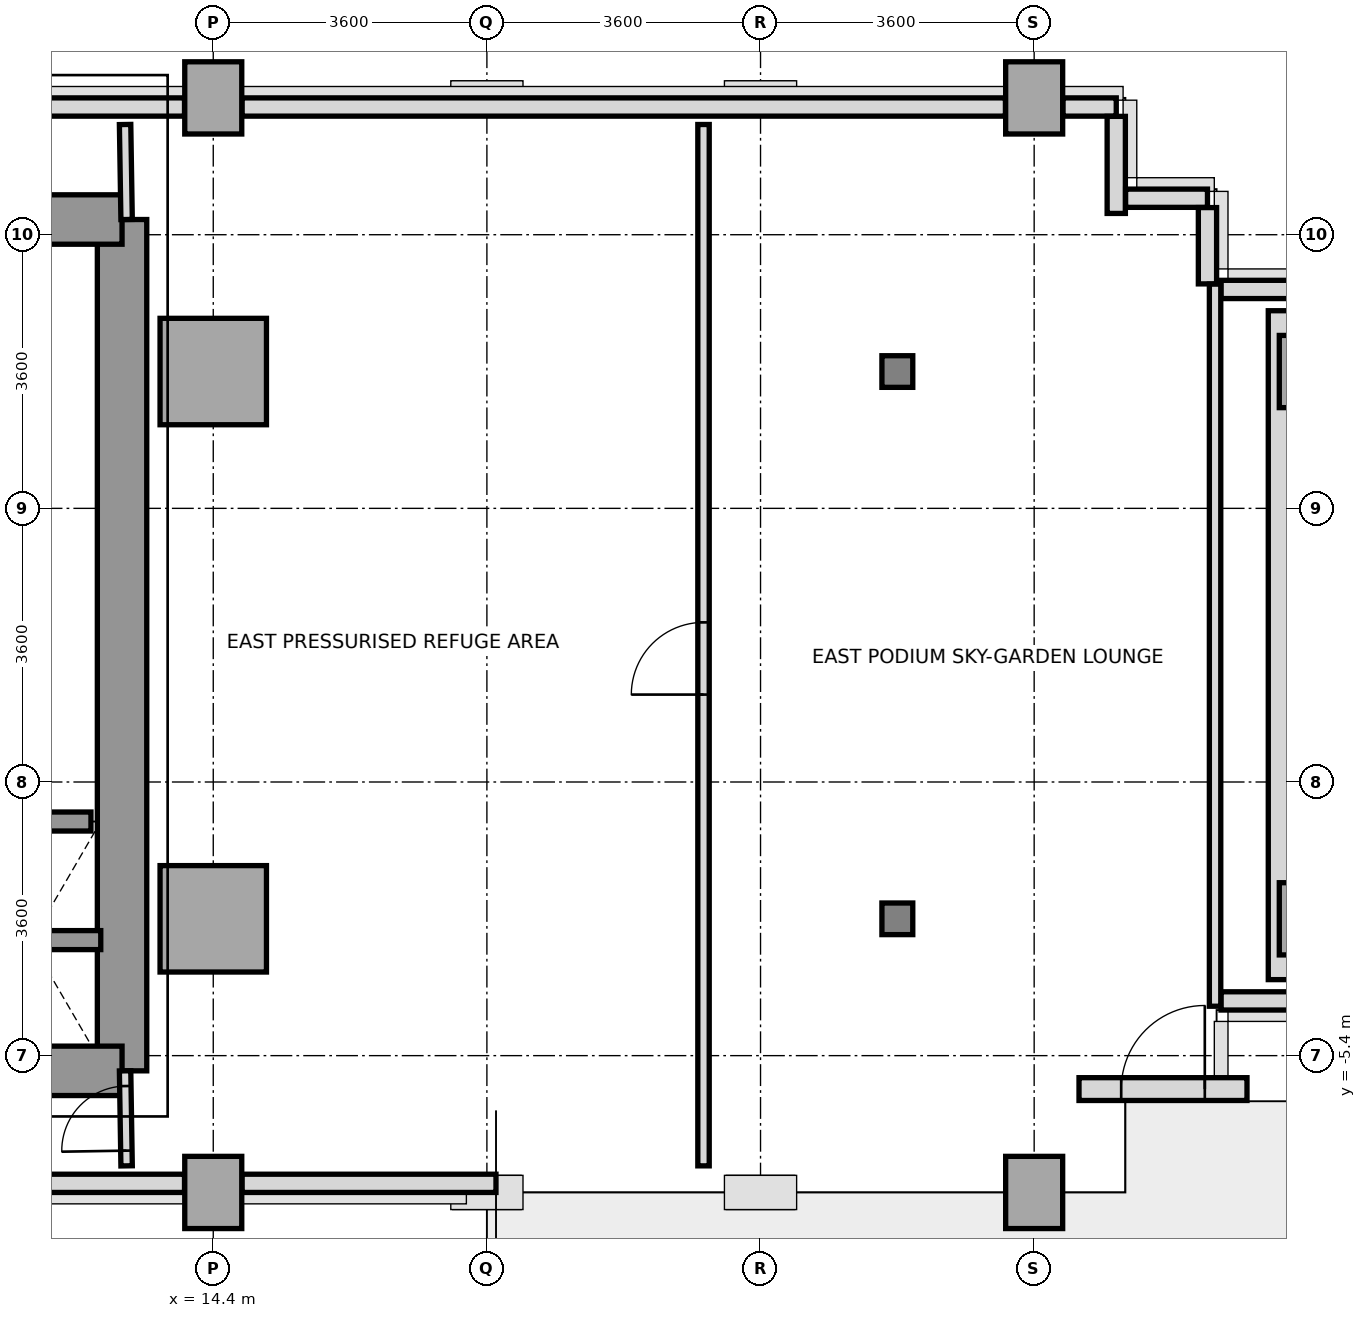
"""IFC4 building model, lengths in metres.
Left out: names, types, materials, properties, quantities, classifications, styles, units other than length and angle.
Written with IfcOpenShell. Run it as: python <this file> out.ifc"""

import sys

from ifc_helpers import new_model, si_unit, direction, frame, frame_2d, origin, origin_2d, place, context, subcontext, project, spatial, rectangle, i_section, extrude, source, transform, mapped, element, fill, save


model = new_model("IFC4")
c1 = context("Model", 3, precision=1e-05, world=origin(), true_north=direction((0.0, 1.0)))
c2 = subcontext(c1, "Body", "Model", "MODEL_VIEW")
j1 = project(units=[si_unit("LENGTHUNIT", "METRE"), si_unit("PLANEANGLEUNIT", "RADIAN")], contexts=[c1])
p1 = place(None, origin())
s1 = spatial("IfcSite", under=j1, at=p1, CompositionType="ELEMENT")
p2 = place(p1, origin())
s2 = spatial("IfcBuilding", under=s1, at=p2, CompositionType="ELEMENT")
p3 = place(p2, frame((0.0, 0.0, 25.2)))
s3 = spatial("IfcBuildingStorey", under=s2, at=p3, CompositionType="ELEMENT", Elevation=25.2)
m1 = source(origin(), c2, "Body", "SweptSolid", [
    extrude(rectangle(XDim=0.75, YDim=0.95, at=origin_2d()), origin(), (0.0, 0.0, 1.0), 5.2),
])
p4 = place(p3, frame((14.4, -7.2, 0.0), z_axis=(0.0, 0.0, 1.0), x_axis=(1.0, 0.0, 0.0)))
e1 = element("IfcColumn", 1, at=p4, inside=s3, PredefinedType="COLUMN", context=c2, shape_type="MappedRepresentation", body=[
    mapped(m1, transform((0.0, 0.0, 0.0), x_axis=(1.0, 0.0, 0.0), y_axis=(0.0, 1.0, 0.0), z_axis=(0.0, 0.0, 1.0), scale=1.0)),
])
m2 = source(origin(), c2, "Body", "SweptSolid", [
    extrude(rectangle(XDim=1.4, YDim=1.4, at=origin_2d()), origin(), (0.0, 0.0, 1.0), 5.2),
])
for number, where, z_axis, x_axis in (
    (2, (14.4, -3.6, 0.0), (0.0, 0.0, 1.0), (1.0, 0.0, 0.0)),
    (3, (14.4, 3.6, 0.0), (0.0, 0.0, 1.0), (1.0, 0.0, 0.0)),
):
    element("IfcColumn", number, at=place(p3, frame(where, z_axis=z_axis, x_axis=x_axis)), inside=s3, PredefinedType="COLUMN", context=c2, shape_type="MappedRepresentation", body=[
        mapped(m2, transform((0.0, 0.0, 0.0), x_axis=(1.0, 0.0, 0.0), y_axis=(0.0, 1.0, 0.0), z_axis=(0.0, 0.0, 1.0), scale=1.0)),
    ])
p5 = place(p3, frame((14.4, 7.2, 0.0), z_axis=(0.0, 0.0, 1.0), x_axis=(1.0, 0.0, 0.0)))
e4 = element("IfcColumn", 4, at=p5, inside=s3, PredefinedType="COLUMN", context=c2, shape_type="MappedRepresentation", body=[
    mapped(m1, transform((0.0, 0.0, 0.0), x_axis=(1.0, 0.0, 0.0), y_axis=(0.0, 1.0, 0.0), z_axis=(0.0, 0.0, 1.0), scale=1.0)),
])
m3 = source(origin(), c2, "Body", "SweptSolid", [
    extrude(i_section(OverallWidth=0.406, OverallDepth=0.416, WebThickness=0.024, FlangeThickness=0.039, at=origin_2d()), origin(), (0.0, 0.0, 1.0), 5.2),
])
for number, where, z_axis, x_axis in (
    (5, (23.4, -3.6, 0.0), (0.0, 0.0, 1.0), (1.0, 0.0, 0.0)),
    (6, (23.4, 3.6, 0.0), (0.0, 0.0, 1.0), (1.0, 0.0, 0.0)),
):
    element("IfcColumn", number, at=place(p3, frame(where, z_axis=z_axis, x_axis=x_axis)), inside=s3, PredefinedType="COLUMN", context=c2, shape_type="MappedRepresentation", body=[
        mapped(m3, transform((0.0, 0.0, 0.0), x_axis=(1.0, 0.0, 0.0), y_axis=(0.0, 1.0, 0.0), z_axis=(0.0, 0.0, 1.0), scale=1.0)),
    ])
for number, where, z_axis, x_axis in (
    (7, (25.2, -7.2, 0.0), (0.0, 0.0, 1.0), (1.0, 0.0, 0.0)),
    (8, (25.2, 7.2, 0.0), (0.0, 0.0, 1.0), (1.0, 0.0, 0.0)),
    (9, (28.8, -3.6, 0.0), (0.0, 0.0, 1.0), (1.0, 0.0, 0.0)),
    (10, (28.8, 3.6, 0.0), (0.0, 0.0, 1.0), (1.0, 0.0, 0.0)),
):
    element("IfcColumn", number, at=place(p3, frame(where, z_axis=z_axis, x_axis=x_axis)), inside=s3, PredefinedType="COLUMN", context=c2, shape_type="MappedRepresentation", body=[
        mapped(m1, transform((0.0, 0.0, 0.0), x_axis=(1.0, 0.0, 0.0), y_axis=(0.0, 1.0, 0.0), z_axis=(0.0, 0.0, 1.0), scale=1.0)),
    ])
p6 = place(p3, frame((28.45, -4.4, 0.0), z_axis=(0.0, 0.0, 1.0), x_axis=(0.0, 1.0, 0.0)))
e11 = element("IfcWall", 11, at=p6, inside=s3, PredefinedType="SOLIDWALL", context=c2, shape_type="SweptSolid", body=[
    extrude(rectangle(XDim=8.8, YDim=0.34, at=frame_2d((4.4, 0.0))), origin(), (0.0, 0.0, 1.0), 4.386),
])
p7 = place(p3, frame((25.79, -5.84, 0.0), z_axis=(0.0, 0.0, 1.0), x_axis=(1.0, 0.0, 0.0)))
e12 = element("IfcWall", 12, at=p7, inside=s3, PredefinedType="SOLIDWALL", context=c2, shape_type="SweptSolid", body=[
    extrude(rectangle(XDim=2.21, YDim=0.3, at=frame_2d((1.105, 0.0))), origin(), (0.0, 0.0, 1.0), 3.4),
])
p8 = place(p7, frame((0.555, 0.0, 0.0)))
e13 = element("IfcOpeningElement", 13, at=p8, cuts=e12, PredefinedType="OPENING", context=c2, shape_type="SweptSolid", body=[
    extrude(rectangle(XDim=1.1, YDim=2.3, at=frame_2d((0.55, 1.15))), frame((0.0, 0.16, 0.0), z_axis=(0.0, -1.0, 0.0), x_axis=(1.0, 0.0, 0.0)), (0.0, 0.0, 1.0), 0.32),
])
p9 = place(p3, frame((28.68, -4.68, 0.0), z_axis=(0.0, 0.0, 1.0), x_axis=(-1.0, 0.0, 0.0)))
e14 = element("IfcWall", 14, at=p9, inside=s3, PredefinedType="PARAPET", context=c2, shape_type="SweptSolid", body=[
    extrude(rectangle(XDim=1.022, YDim=0.24, at=frame_2d((0.511, 0.0))), origin(), (0.0, 0.0, 1.0), 1.15),
])
p10 = place(p3, frame((18.119, -7.08, 0.0), z_axis=(0.0, 0.0, 1.0), x_axis=(-1.0, 0.0, 0.0)))
e15 = element("IfcWall", 15, at=p10, inside=s3, PredefinedType="PARAPET", context=c2, shape_type="SweptSolid", body=[
    extrude(rectangle(XDim=3.341, YDim=0.24, at=frame_2d((1.671, 0.0))), origin(), (0.0, 0.0, 1.0), 1.15),
])
p11 = place(p3, frame((14.022, -7.08, 0.0), z_axis=(0.0, 0.0, 1.0), x_axis=(-1.0, 0.0, 0.0)))
e16 = element("IfcWall", 16, at=p11, inside=s3, PredefinedType="PARAPET", context=c2, shape_type="SweptSolid", body=[
    extrude(rectangle(XDim=4.742, YDim=0.24, at=frame_2d((2.371, 0.0))), origin(), (0.0, 0.0, 1.0), 1.15),
])
p12 = place(p3, frame((11.295, 7.08, 0.0), z_axis=(0.0, 0.0, 1.0), x_axis=(1.0, 0.0, 0.0)))
e17 = element("IfcWall", 17, at=p12, inside=s3, PredefinedType="PARAPET", context=c2, shape_type="SweptSolid", body=[
    extrude(rectangle(XDim=2.727, YDim=0.24, at=frame_2d((1.364, 0.0))), origin(), (0.0, 0.0, 1.0), 1.15),
])
p13 = place(p3, frame((14.778, 7.08, 0.0), z_axis=(0.0, 0.0, 1.0), x_axis=(1.0, 0.0, 0.0)))
e18 = element("IfcWall", 18, at=p13, inside=s3, PredefinedType="PARAPET", context=c2, shape_type="SweptSolid", body=[
    extrude(rectangle(XDim=10.044, YDim=0.24, at=frame_2d((5.022, 0.0))), origin(), (0.0, 0.0, 1.0), 1.15),
])
p14 = place(p3, frame((25.578, 7.08, 0.0), z_axis=(0.0, 0.0, 1.0), x_axis=(1.0, 0.0, 0.0)))
e19 = element("IfcWall", 19, at=p14, inside=s3, PredefinedType="PARAPET", context=c2, shape_type="SweptSolid", body=[
    extrude(rectangle(XDim=0.702, YDim=0.24, at=frame_2d((0.351, 0.0))), origin(), (0.0, 0.0, 1.0), 1.15),
])
p15 = place(p3, frame((26.28, 6.957, 0.0), z_axis=(0.0, 0.0, 1.0), x_axis=(0.0, -1.0, 0.0)))
e20 = element("IfcWall", 20, at=p15, inside=s3, PredefinedType="PARAPET", context=c2, shape_type="SweptSolid", body=[
    extrude(rectangle(XDim=1.277, YDim=0.24, at=frame_2d((0.639, 0.0))), origin(), (0.0, 0.0, 1.0), 1.15),
])
p16 = place(p3, frame((26.403, 5.88, 0.0), z_axis=(0.0, 0.0, 1.0), x_axis=(1.0, 0.0, 0.0)))
e21 = element("IfcWall", 21, at=p16, inside=s3, PredefinedType="PARAPET", context=c2, shape_type="SweptSolid", body=[
    extrude(rectangle(XDim=1.077, YDim=0.24, at=frame_2d((0.539, 0.0))), origin(), (0.0, 0.0, 1.0), 1.15),
])
p17 = place(p3, frame((27.48, 5.757, 0.0), z_axis=(0.0, 0.0, 1.0), x_axis=(0.0, -1.0, 0.0)))
e22 = element("IfcWall", 22, at=p17, inside=s3, PredefinedType="PARAPET", context=c2, shape_type="SweptSolid", body=[
    extrude(rectangle(XDim=1.004, YDim=0.24, at=frame_2d((0.502, 0.0))), origin(), (0.0, 0.0, 1.0), 1.15),
])
p18 = place(p3, frame((27.658, 4.68, 0.0), z_axis=(0.0, 0.0, 1.0), x_axis=(1.0, 0.0, 0.0)))
e23 = element("IfcWall", 23, at=p18, inside=s3, PredefinedType="PARAPET", context=c2, shape_type="SweptSolid", body=[
    extrude(rectangle(XDim=1.022, YDim=0.24, at=frame_2d((0.511, 0.0))), origin(), (0.0, 0.0, 1.0), 1.15),
])
p19 = place(p3, frame((13.2, -5.6, 0.0), z_axis=(0.0, 0.0, 1.0), x_axis=(0.0, 1.0, 0.0)))
e24 = element("IfcWall", 24, at=p19, inside=s3, PredefinedType="SHEAR", context=c2, shape_type="SweptSolid", body=[
    extrude(rectangle(XDim=11.2, YDim=0.65, at=frame_2d((5.6, 0.0))), origin(), (0.0, 0.0, 1.0), 5.2),
])
p20 = place(p3, frame((11.381, 5.6, 0.0), z_axis=(0.0, 0.0, 1.0), x_axis=(1.0, 0.0, 0.0)))
e25 = element("IfcWall", 25, at=p20, inside=s3, PredefinedType="SHEAR", context=c2, shape_type="SweptSolid", body=[
    extrude(rectangle(XDim=1.819, YDim=0.65, at=frame_2d((0.909, 0.0))), origin(), (0.0, 0.0, 1.0), 5.2),
])
p21 = place(p3, frame((5.4, -5.6, 0.0), z_axis=(0.0, 0.0, 1.0), x_axis=(1.0, 0.0, 0.0)))
e26 = element("IfcWall", 26, at=p21, inside=s3, PredefinedType="SHEAR", context=c2, shape_type="SweptSolid", body=[
    extrude(rectangle(XDim=7.8, YDim=0.65, at=frame_2d((3.9, 0.0))), origin(), (0.0, 0.0, 1.0), 5.2),
])
p22 = place(p21, frame((3.0, 0.0, 0.0)))
e27 = element("IfcOpeningElement", 27, at=p22, cuts=e26, PredefinedType="OPENING", context=c2, shape_type="SweptSolid", body=[
    extrude(rectangle(XDim=1.2, YDim=2.2, at=frame_2d((0.6, 1.1))), frame((0.0, 0.335, 0.0), z_axis=(0.0, -1.0, 0.0), x_axis=(1.0, 0.0, 0.0)), (0.0, 0.0, 1.0), 0.67),
])
p23 = place(p3, frame((11.08, -3.88, 0.0), z_axis=(0.0, 0.0, 1.0), x_axis=(1.0, 0.0, 0.0)))
e28 = element("IfcWall", 28, at=p23, inside=s3, PredefinedType="SOLIDWALL", context=c2, shape_type="SweptSolid", body=[
    extrude(rectangle(XDim=1.84, YDim=0.25, at=frame_2d((0.92, 0.0))), origin(), (0.0, 0.0, 1.0), 5.2),
])
p24 = place(p3, frame((11.209, -2.32, 0.0), z_axis=(0.0, 0.0, 1.0), x_axis=(1.0, 0.0, 0.0)))
e29 = element("IfcWall", 29, at=p24, inside=s3, PredefinedType="SOLIDWALL", context=c2, shape_type="SweptSolid", body=[
    extrude(rectangle(XDim=1.582, YDim=0.25, at=frame_2d((0.791, 0.0))), origin(), (0.0, 0.0, 1.0), 5.2),
])
p25 = place(p3, frame((27.58, -4.75, 0.0), z_axis=(0.0, 0.0, 1.0), x_axis=(0.0, 1.0, 0.0)))
e30 = element("IfcWall", 30, at=p25, inside=s3, PredefinedType="PARTITIONING", context=c2, shape_type="SweptSolid", body=[
    extrude(rectangle(XDim=9.5, YDim=0.15, at=frame_2d((4.75, 0.0))), origin(), (0.0, 0.0, 1.0), 4.386),
])
p26 = place(p3, frame((13.26, -6.85, 0.0), z_axis=(0.0, 0.0, 1.0), x_axis=(-0.016013571389, 0.999871774545, 0.0)))
e31 = element("IfcWall", 31, at=p26, inside=s3, PredefinedType="PARTITIONING", context=c2, shape_type="SweptSolid", body=[
    extrude(rectangle(XDim=1.25, YDim=0.15, at=frame_2d((0.625, 0.0))), origin(), (0.0, 0.0, 1.0), 5.2),
])
p27 = place(p26, frame((0.2, 0.0, 0.0)))
e32 = element("IfcOpeningElement", 32, at=p27, cuts=e31, PredefinedType="OPENING", context=c2, shape_type="SweptSolid", body=[
    extrude(rectangle(XDim=0.85, YDim=2.1, at=frame_2d((0.425, 1.05))), frame((0.0, 0.085, 0.0), z_axis=(0.0, -1.0, 0.0), x_axis=(1.0, 0.0, 0.0)), (0.0, 0.0, 1.0), 0.17),
])
p28 = place(p3, frame((13.26, 5.6, 0.0), z_axis=(0.0, 0.0, 1.0), x_axis=(-0.016013571389, 0.999871774545, 0.0)))
e33 = element("IfcWall", 33, at=p28, inside=s3, PredefinedType="PARTITIONING", context=c2, shape_type="SweptSolid", body=[
    extrude(rectangle(XDim=1.25, YDim=0.15, at=frame_2d((0.625, 0.0))), origin(), (0.0, 0.0, 1.0), 5.2),
])
p29 = place(p3, frame((20.85, -6.85, 0.0), z_axis=(0.0, 0.0, 1.0), x_axis=(0.0, 1.0, 0.0)))
e34 = element("IfcWall", 34, at=p29, inside=s3, PredefinedType="PARTITIONING", context=c2, shape_type="SweptSolid", body=[
    extrude(rectangle(XDim=13.7, YDim=0.15, at=frame_2d((6.85, 0.0))), origin(), (0.0, 0.0, 1.0), 3.4),
])
p30 = place(p29, frame((6.2, 0.0, 0.0)))
e35 = element("IfcOpeningElement", 35, at=p30, cuts=e34, PredefinedType="OPENING", context=c2, shape_type="SweptSolid", body=[
    extrude(rectangle(XDim=0.95, YDim=2.15, at=frame_2d((0.475, 1.075))), frame((0.0, 0.085, 0.0), z_axis=(0.0, -1.0, 0.0), x_axis=(1.0, 0.0, 0.0)), (0.0, 0.0, 1.0), 0.17),
])
m4 = source(origin(), c2, "Body", "SweptSolid", [
    extrude(rectangle(XDim=1.1, YDim=2.3, at=frame_2d((0.55, 1.15))), frame((0.0, 0.025, 0.0), z_axis=(0.0, -1.0, 0.0), x_axis=(1.0, 0.0, 0.0)), (0.0, 0.0, 1.0), 0.05),
])
p31 = place(p8, frame((1.1, 0.0, 0.0), z_axis=(0.0, 0.0, 1.0), x_axis=(-1.0, 0.0, 0.0)))
e36 = element("IfcDoor", 36, at=p31, inside=s3, OperationType="SINGLE_SWING_RIGHT", PredefinedType="DOOR", context=c2, shape_type="MappedRepresentation", body=[
    mapped(m4, transform((0.0, 0.0, 0.0), x_axis=(1.0, 0.0, 0.0), y_axis=(0.0, 1.0, 0.0), z_axis=(0.0, 0.0, 1.0), scale=1.0)),
])
fill(e13, e36)
m5 = source(origin(), c2, "Body", "SweptSolid", [
    extrude(rectangle(XDim=0.95, YDim=2.15, at=frame_2d((0.475, 1.075))), frame((0.0, 0.025, 0.0), z_axis=(0.0, -1.0, 0.0), x_axis=(1.0, 0.0, 0.0)), (0.0, 0.0, 1.0), 0.05),
])
p32 = place(p30, origin())
e37 = element("IfcDoor", 37, at=p32, inside=s3, OperationType="SINGLE_SWING_LEFT", PredefinedType="DOOR", context=c2, shape_type="MappedRepresentation", body=[
    mapped(m5, transform((0.0, 0.0, 0.0), x_axis=(1.0, 0.0, 0.0), y_axis=(0.0, 1.0, 0.0), z_axis=(0.0, 0.0, 1.0), scale=1.0)),
])
fill(e35, e37)
m6 = source(origin(), c2, "Body", "SweptSolid", [
    extrude(rectangle(XDim=0.85, YDim=2.1, at=frame_2d((0.425, 1.05))), frame((0.0, 0.025, 0.0), z_axis=(0.0, -1.0, 0.0), x_axis=(1.0, 0.0, 0.0)), (0.0, 0.0, 1.0), 0.05),
])
p33 = place(p27, origin())
e38 = element("IfcDoor", 38, at=p33, inside=s3, OperationType="SINGLE_SWING_LEFT", PredefinedType="DOOR", context=c2, shape_type="MappedRepresentation", body=[
    mapped(m6, transform((0.0, 0.0, 0.0), x_axis=(1.0, 0.0, 0.0), y_axis=(0.0, 1.0, 0.0), z_axis=(0.0, 0.0, 1.0), scale=1.0)),
])
fill(e32, e38)
save(model, sys.argv[1])
